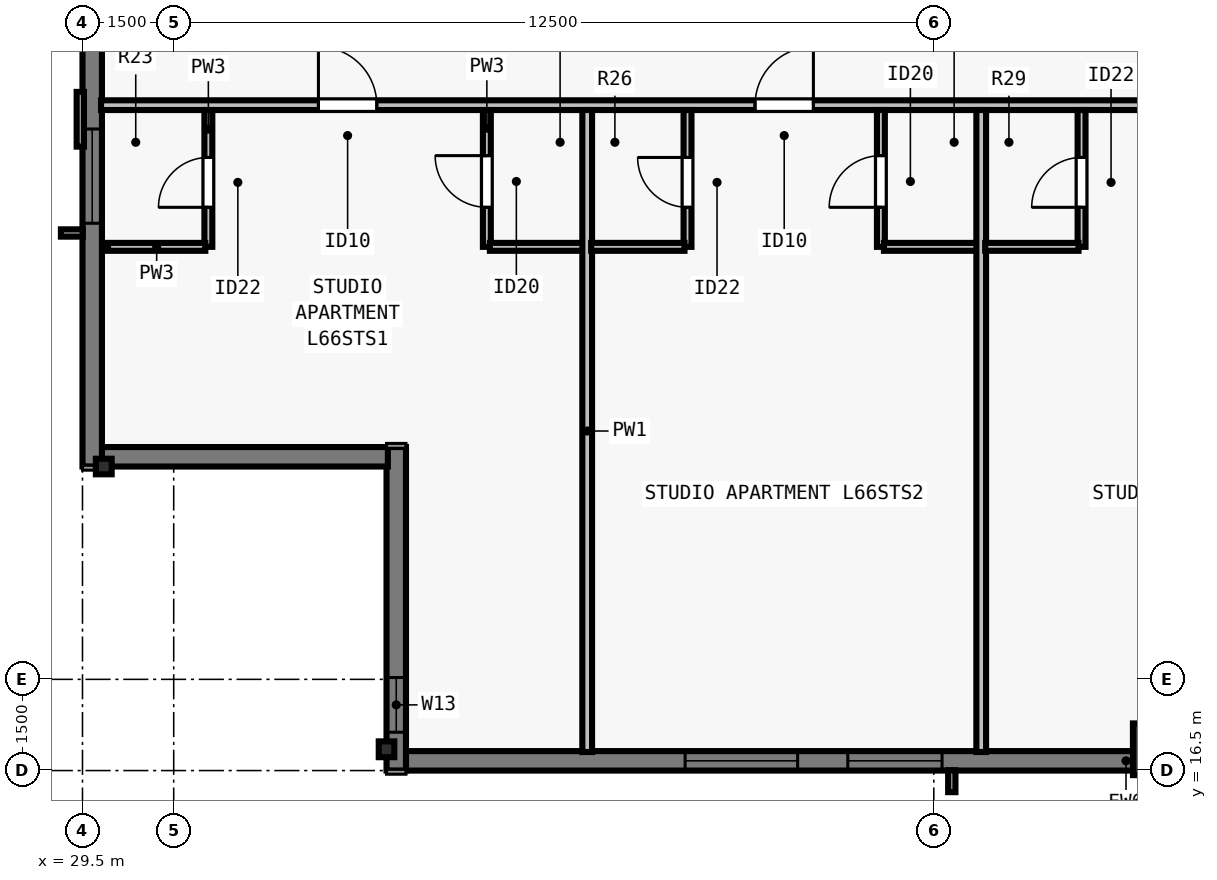
"""IFC4 building model, lengths in metres.
Left out: names, types, materials, properties, quantities, classifications, styles, units other than length and angle.
Written with IfcOpenShell. Run it as: python <this file> out.ifc"""

import sys

from ifc_helpers import new_model, si_unit, direction, frame, frame_2d, origin, origin_2d, place, context, subcontext, project, spatial, rectangle, i_section, extrude, element, fill, save


model = new_model("IFC4")
c1 = context("Model", 3, precision=1e-05, world=origin(), true_north=direction((0.0, 1.0)))
c2 = subcontext(c1, "Body", "Model", "MODEL_VIEW")
j1 = project(units=[si_unit("LENGTHUNIT", "METRE"), si_unit("PLANEANGLEUNIT", "RADIAN")], contexts=[c1])
p1 = place(None, origin())
s1 = spatial("IfcSite", under=j1, at=p1, CompositionType="ELEMENT")
p2 = place(p1, origin())
s2 = spatial("IfcBuilding", under=s1, at=p2, CompositionType="ELEMENT")
p3 = place(p2, frame((0.0, 0.0, 241.0)))
s3 = spatial("IfcBuildingStorey", under=s2, at=p3, CompositionType="ELEMENT", Elevation=241.0)
p4 = place(p3, frame((34.5, 16.85, 0.0), z_axis=(0.0, 0.0, 1.0), x_axis=(1.0, 0.0, 0.0)))
e1 = element("IfcColumn", 1, at=p4, inside=s3, PredefinedType="COLUMN", context=c2, shape_type="SweptSolid", body=[
    extrude(i_section(OverallWidth=0.256, OverallDepth=0.26, WebThickness=0.01, FlangeThickness=0.017, FilletRadius=0.013, at=origin_2d()), origin(), (0.0, 0.0, 1.0), 3.5),
])
p5 = place(p3, frame((47.2, 16.85, 0.0), z_axis=(0.0, 0.0, 1.0), x_axis=(1.0, 0.0, 0.0)))
e2 = element("IfcColumn", 2, at=p5, inside=s3, PredefinedType="COLUMN", context=c2, shape_type="SweptSolid", body=[
    extrude(rectangle(XDim=0.85, YDim=0.85, at=origin_2d()), origin(), (0.0, 0.0, 1.0), 3.5),
])
p6 = place(p3, frame((29.85, 21.5, 0.0), z_axis=(0.0, 0.0, 1.0), x_axis=(0.0, 1.0, 0.0)))
e3 = element("IfcColumn", 3, at=p6, inside=s3, PredefinedType="COLUMN", context=c2, shape_type="SweptSolid", body=[
    extrude(i_section(OverallWidth=0.256, OverallDepth=0.26, WebThickness=0.01, FlangeThickness=0.017, FilletRadius=0.013, at=origin_2d()), origin(), (0.0, 0.0, 1.0), 3.5),
])
p7 = place(p3, frame((69.5, 16.66, 0.0), z_axis=(0.0, 0.0, 1.0), x_axis=(-1.0, 0.0, 0.0)))
e4 = element("IfcWall", 4, at=p7, inside=s3, PredefinedType="SOLIDWALL", context=c2, shape_type="SweptSolid", body=[
    extrude(rectangle(XDim=34.702, YDim=0.32, at=frame_2d((17.351, 0.0))), origin(), (0.0, 0.0, 1.0), 3.29),
])
p8 = place(p7, frame((4.763, 0.0, 0.8)))
e5 = element("IfcOpeningElement", 5, at=p8, cuts=e4, PredefinedType="OPENING", context=c2, shape_type="SweptSolid", body=[
    extrude(rectangle(XDim=1.55, YDim=1.678, at=frame_2d((0.775, 0.839))), frame((0.0, 0.17, 0.0), z_axis=(0.0, -1.0, 0.0), x_axis=(1.0, 0.0, 0.0)), (0.0, 0.0, 1.0), 0.34),
])
p9 = place(p7, frame((7.988, 0.0, 0.8)))
e6 = element("IfcOpeningElement", 6, at=p9, cuts=e4, PredefinedType="OPENING", context=c2, shape_type="SweptSolid", body=[
    extrude(rectangle(XDim=1.85, YDim=1.678, at=frame_2d((0.925, 0.839))), frame((0.0, 0.17, 0.0), z_axis=(0.0, -1.0, 0.0), x_axis=(1.0, 0.0, 0.0)), (0.0, 0.0, 1.0), 0.34),
])
p10 = place(p7, frame((14.738, 0.0, 0.8)))
e7 = element("IfcOpeningElement", 7, at=p10, cuts=e4, PredefinedType="OPENING", context=c2, shape_type="SweptSolid", body=[
    extrude(rectangle(XDim=1.85, YDim=1.678, at=frame_2d((0.925, 0.839))), frame((0.0, 0.17, 0.0), z_axis=(0.0, -1.0, 0.0), x_axis=(1.0, 0.0, 0.0)), (0.0, 0.0, 1.0), 0.34),
])
p11 = place(p7, frame((18.264, 0.0, 0.8)))
e8 = element("IfcOpeningElement", 8, at=p11, cuts=e4, PredefinedType="OPENING", context=c2, shape_type="SweptSolid", body=[
    extrude(rectangle(XDim=1.55, YDim=1.678, at=frame_2d((0.775, 0.839))), frame((0.0, 0.17, 0.0), z_axis=(0.0, -1.0, 0.0), x_axis=(1.0, 0.0, 0.0)), (0.0, 0.0, 1.0), 0.34),
])
p12 = place(p7, frame((25.864, 0.0, 0.8)))
e9 = element("IfcOpeningElement", 9, at=p12, cuts=e4, PredefinedType="OPENING", context=c2, shape_type="SweptSolid", body=[
    extrude(rectangle(XDim=1.55, YDim=1.678, at=frame_2d((0.775, 0.839))), frame((0.0, 0.17, 0.0), z_axis=(0.0, -1.0, 0.0), x_axis=(1.0, 0.0, 0.0)), (0.0, 0.0, 1.0), 0.34),
])
p13 = place(p7, frame((28.24, 0.0, 0.8)))
e10 = element("IfcOpeningElement", 10, at=p13, cuts=e4, PredefinedType="OPENING", context=c2, shape_type="SweptSolid", body=[
    extrude(rectangle(XDim=1.85, YDim=1.678, at=frame_2d((0.925, 0.839))), frame((0.0, 0.17, 0.0), z_axis=(0.0, -1.0, 0.0), x_axis=(1.0, 0.0, 0.0)), (0.0, 0.0, 1.0), 0.34),
])
p14 = place(p3, frame((34.66, 16.5, 0.0), z_axis=(0.0, 0.0, 1.0), x_axis=(0.0, 1.0, 0.0)))
e11 = element("IfcWall", 11, at=p14, inside=s3, PredefinedType="SOLIDWALL", context=c2, shape_type="SweptSolid", body=[
    extrude(rectangle(XDim=5.32, YDim=0.32, at=frame_2d((2.66, 0.0))), origin(), (0.0, 0.0, 1.0), 3.29),
])
p15 = place(p14, frame((0.63, 0.0, 0.8)))
e12 = element("IfcOpeningElement", 12, at=p15, cuts=e11, PredefinedType="OPENING", context=c2, shape_type="SweptSolid", body=[
    extrude(rectangle(XDim=0.9, YDim=1.678, at=frame_2d((0.45, 0.839))), frame((0.0, 0.17, 0.0), z_axis=(0.0, -1.0, 0.0), x_axis=(1.0, 0.0, 0.0)), (0.0, 0.0, 1.0), 0.34),
])
p16 = place(p3, frame((34.522, 21.66, 0.0), z_axis=(0.0, 0.0, 1.0), x_axis=(-1.0, 0.0, 0.0)))
e13 = element("IfcWall", 13, at=p16, inside=s3, PredefinedType="SOLIDWALL", context=c2, shape_type="SweptSolid", body=[
    extrude(rectangle(XDim=4.724, YDim=0.32, at=frame_2d((2.362, 0.0))), origin(), (0.0, 0.0, 1.0), 3.29),
])
p17 = place(p3, frame((29.66, 21.5, 0.0), z_axis=(0.0, 0.0, 1.0), x_axis=(0.0, 1.0, 0.0)))
e14 = element("IfcWall", 14, at=p17, inside=s3, PredefinedType="SOLIDWALL", context=c2, shape_type="SweptSolid", body=[
    extrude(rectangle(XDim=13.802, YDim=0.32, at=frame_2d((6.901, 0.0))), origin(), (0.0, 0.0, 1.0), 3.29),
])
p18 = place(p17, frame((4.0, 0.0, 0.8)))
e15 = element("IfcOpeningElement", 15, at=p18, cuts=e14, PredefinedType="OPENING", context=c2, shape_type="SweptSolid", body=[
    extrude(rectangle(XDim=1.55, YDim=1.678, at=frame_2d((0.775, 0.839))), frame((0.0, 0.17, 0.0), z_axis=(0.0, -1.0, 0.0), x_axis=(1.0, 0.0, 0.0)), (0.0, 0.0, 1.0), 0.34),
])
p19 = place(p17, frame((9.451, 0.0, 0.8)))
e16 = element("IfcOpeningElement", 16, at=p19, cuts=e14, PredefinedType="OPENING", context=c2, shape_type="SweptSolid", body=[
    extrude(rectangle(XDim=1.85, YDim=1.678, at=frame_2d((0.925, 0.839))), frame((0.0, 0.17, 0.0), z_axis=(0.0, -1.0, 0.0), x_axis=(1.0, 0.0, 0.0)), (0.0, 0.0, 1.0), 0.34),
])
p20 = place(p3, frame((29.805, 27.442, 0.0), z_axis=(0.0, 0.0, 1.0), x_axis=(1.0, 0.0, 0.0)))
e17 = element("IfcWall", 17, at=p20, inside=s3, PredefinedType="PARTITIONING", context=c2, shape_type="SweptSolid", body=[
    extrude(rectangle(XDim=44.39, YDim=0.16, at=frame_2d((22.195, 0.0))), origin(), (0.0, 0.0, 1.0), 2.958),
])
p21 = place(p20, frame((3.575, 0.0, 0.0)))
e18 = element("IfcOpeningElement", 18, at=p21, cuts=e17, PredefinedType="OPENING", context=c2, shape_type="SweptSolid", body=[
    extrude(rectangle(XDim=0.96, YDim=2.18, at=frame_2d((0.48, 1.09))), frame((0.0, 0.09, 0.0), z_axis=(0.0, -1.0, 0.0), x_axis=(1.0, 0.0, 0.0)), (0.0, 0.0, 1.0), 0.18),
])
p22 = place(p20, frame((10.755, 0.0, 0.0)))
e19 = element("IfcOpeningElement", 19, at=p22, cuts=e17, PredefinedType="OPENING", context=c2, shape_type="SweptSolid", body=[
    extrude(rectangle(XDim=0.96, YDim=2.18, at=frame_2d((0.48, 1.09))), frame((0.0, 0.09, 0.0), z_axis=(0.0, -1.0, 0.0), x_axis=(1.0, 0.0, 0.0)), (0.0, 0.0, 1.0), 0.18),
])
p23 = place(p20, frame((18.115, 0.0, 0.0)))
e20 = element("IfcOpeningElement", 20, at=p23, cuts=e17, PredefinedType="OPENING", context=c2, shape_type="SweptSolid", body=[
    extrude(rectangle(XDim=0.96, YDim=2.18, at=frame_2d((0.48, 1.09))), frame((0.0, 0.09, 0.0), z_axis=(0.0, -1.0, 0.0), x_axis=(1.0, 0.0, 0.0)), (0.0, 0.0, 1.0), 0.18),
])
p24 = place(p20, frame((25.475, 0.0, 0.0)))
e21 = element("IfcOpeningElement", 21, at=p24, cuts=e17, PredefinedType="OPENING", context=c2, shape_type="SweptSolid", body=[
    extrude(rectangle(XDim=0.96, YDim=2.18, at=frame_2d((0.48, 1.09))), frame((0.0, 0.09, 0.0), z_axis=(0.0, -1.0, 0.0), x_axis=(1.0, 0.0, 0.0)), (0.0, 0.0, 1.0), 0.18),
])
p25 = place(p20, frame((32.835, 0.0, 0.0)))
e22 = element("IfcOpeningElement", 22, at=p25, cuts=e17, PredefinedType="OPENING", context=c2, shape_type="SweptSolid", body=[
    extrude(rectangle(XDim=0.96, YDim=2.18, at=frame_2d((0.48, 1.09))), frame((0.0, 0.09, 0.0), z_axis=(0.0, -1.0, 0.0), x_axis=(1.0, 0.0, 0.0)), (0.0, 0.0, 1.0), 0.18),
])
p26 = place(p20, frame((40.375, 0.0, 0.0)))
e23 = element("IfcOpeningElement", 23, at=p26, cuts=e17, PredefinedType="OPENING", context=c2, shape_type="SweptSolid", body=[
    extrude(rectangle(XDim=0.96, YDim=2.18, at=frame_2d((0.48, 1.09))), frame((0.0, 0.09, 0.0), z_axis=(0.0, -1.0, 0.0), x_axis=(1.0, 0.0, 0.0)), (0.0, 0.0, 1.0), 0.18),
])
p27 = place(p3, frame((31.57, 25.113, 0.0), z_axis=(0.0, 0.0, 1.0), x_axis=(0.0, 1.0, 0.0)))
e24 = element("IfcWall", 24, at=p27, inside=s3, PredefinedType="PLUMBINGWALL", context=c2, shape_type="SweptSolid", body=[
    extrude(rectangle(XDim=2.25, YDim=0.13, at=frame_2d((1.125, 0.0))), origin(), (0.0, 0.0, 1.0), 3.29),
])
p28 = place(p27, frame((0.65, 0.0, 0.0)))
e25 = element("IfcOpeningElement", 25, at=p28, cuts=e24, PredefinedType="OPENING", context=c2, shape_type="SweptSolid", body=[
    extrude(rectangle(XDim=0.82, YDim=2.1, at=frame_2d((0.41, 1.05))), frame((0.0, 0.075, 0.0), z_axis=(0.0, -1.0, 0.0), x_axis=(1.0, 0.0, 0.0)), (0.0, 0.0, 1.0), 0.15),
])
p29 = place(p3, frame((29.92, 25.113, 0.0), z_axis=(0.0, 0.0, 1.0), x_axis=(1.0, 0.0, 0.0)))
e26 = element("IfcWall", 26, at=p29, inside=s3, PredefinedType="PLUMBINGWALL", context=c2, shape_type="SweptSolid", body=[
    extrude(rectangle(XDim=1.6, YDim=0.13, at=frame_2d((0.8, 0.0))), origin(), (0.0, 0.0, 1.0), 3.29),
])
p30 = place(p3, frame((36.15, 25.113, 0.0), z_axis=(0.0, 0.0, 1.0), x_axis=(0.0, 1.0, 0.0)))
e27 = element("IfcWall", 27, at=p30, inside=s3, PredefinedType="PLUMBINGWALL", context=c2, shape_type="SweptSolid", body=[
    extrude(rectangle(XDim=2.25, YDim=0.13, at=frame_2d((1.125, 0.0))), origin(), (0.0, 0.0, 1.0), 3.29),
])
p31 = place(p30, frame((0.65, 0.0, 0.0)))
e28 = element("IfcOpeningElement", 28, at=p31, cuts=e27, PredefinedType="OPENING", context=c2, shape_type="SweptSolid", body=[
    extrude(rectangle(XDim=0.85, YDim=2.1, at=frame_2d((0.425, 1.05))), frame((0.0, 0.075, 0.0), z_axis=(0.0, -1.0, 0.0), x_axis=(1.0, 0.0, 0.0)), (0.0, 0.0, 1.0), 0.15),
])
p32 = place(p3, frame((36.2, 25.113, 0.0), z_axis=(0.0, 0.0, 1.0), x_axis=(1.0, 0.0, 0.0)))
e29 = element("IfcWall", 29, at=p32, inside=s3, PredefinedType="PLUMBINGWALL", context=c2, shape_type="SweptSolid", body=[
    extrude(rectangle(XDim=1.6, YDim=0.13, at=frame_2d((0.8, 0.0))), origin(), (0.0, 0.0, 1.0), 3.29),
])
p33 = place(p3, frame((37.8, 16.805, 0.0), z_axis=(0.0, 0.0, 1.0), x_axis=(0.0, 1.0, 0.0)))
e30 = element("IfcWall", 30, at=p33, inside=s3, PredefinedType="PARTITIONING", context=c2, shape_type="SweptSolid", body=[
    extrude(rectangle(XDim=10.558, YDim=0.16, at=frame_2d((5.279, 0.0))), origin(), (0.0, 0.0, 1.0), 2.573),
])
p34 = place(p3, frame((39.45, 25.113, 0.0), z_axis=(0.0, 0.0, 1.0), x_axis=(0.0, 1.0, 0.0)))
e31 = element("IfcWall", 31, at=p34, inside=s3, PredefinedType="PLUMBINGWALL", context=c2, shape_type="SweptSolid", body=[
    extrude(rectangle(XDim=2.25, YDim=0.13, at=frame_2d((1.125, 0.0))), origin(), (0.0, 0.0, 1.0), 3.29),
])
p35 = place(p34, frame((0.65, 0.0, 0.0)))
e32 = element("IfcOpeningElement", 32, at=p35, cuts=e31, PredefinedType="OPENING", context=c2, shape_type="SweptSolid", body=[
    extrude(rectangle(XDim=0.82, YDim=2.1, at=frame_2d((0.41, 1.05))), frame((0.0, 0.075, 0.0), z_axis=(0.0, -1.0, 0.0), x_axis=(1.0, 0.0, 0.0)), (0.0, 0.0, 1.0), 0.15),
])
p36 = place(p3, frame((37.865, 25.113, 0.0), z_axis=(0.0, 0.0, 1.0), x_axis=(1.0, 0.0, 0.0)))
e33 = element("IfcWall", 33, at=p36, inside=s3, PredefinedType="PLUMBINGWALL", context=c2, shape_type="SweptSolid", body=[
    extrude(rectangle(XDim=1.535, YDim=0.13, at=frame_2d((0.768, 0.0))), origin(), (0.0, 0.0, 1.0), 3.29),
])
p37 = place(p3, frame((42.63, 25.113, 0.0), z_axis=(0.0, 0.0, 1.0), x_axis=(0.0, 1.0, 0.0)))
e34 = element("IfcWall", 34, at=p37, inside=s3, PredefinedType="PLUMBINGWALL", context=c2, shape_type="SweptSolid", body=[
    extrude(rectangle(XDim=2.25, YDim=0.13, at=frame_2d((1.125, 0.0))), origin(), (0.0, 0.0, 1.0), 3.29),
])
p38 = place(p37, frame((0.65, 0.0, 0.0)))
e35 = element("IfcOpeningElement", 35, at=p38, cuts=e34, PredefinedType="OPENING", context=c2, shape_type="SweptSolid", body=[
    extrude(rectangle(XDim=0.85, YDim=2.1, at=frame_2d((0.425, 1.05))), frame((0.0, 0.075, 0.0), z_axis=(0.0, -1.0, 0.0), x_axis=(1.0, 0.0, 0.0)), (0.0, 0.0, 1.0), 0.15),
])
p39 = place(p3, frame((42.68, 25.113, 0.0), z_axis=(0.0, 0.0, 1.0), x_axis=(1.0, 0.0, 0.0)))
e36 = element("IfcWall", 36, at=p39, inside=s3, PredefinedType="PLUMBINGWALL", context=c2, shape_type="SweptSolid", body=[
    extrude(rectangle(XDim=1.6, YDim=0.13, at=frame_2d((0.8, 0.0))), origin(), (0.0, 0.0, 1.0), 3.29),
])
p40 = place(p3, frame((44.28, 16.805, 0.0), z_axis=(0.0, 0.0, 1.0), x_axis=(0.0, 1.0, 0.0)))
e37 = element("IfcWall", 37, at=p40, inside=s3, PredefinedType="PARTITIONING", context=c2, shape_type="SweptSolid", body=[
    extrude(rectangle(XDim=10.558, YDim=0.16, at=frame_2d((5.279, 0.0))), origin(), (0.0, 0.0, 1.0), 3.29),
])
p41 = place(p3, frame((45.93, 25.113, 0.0), z_axis=(0.0, 0.0, 1.0), x_axis=(0.0, 1.0, 0.0)))
e38 = element("IfcWall", 38, at=p41, inside=s3, PredefinedType="PLUMBINGWALL", context=c2, shape_type="SweptSolid", body=[
    extrude(rectangle(XDim=2.25, YDim=0.13, at=frame_2d((1.125, 0.0))), origin(), (0.0, 0.0, 1.0), 3.29),
])
p42 = place(p41, frame((0.65, 0.0, 0.0)))
e39 = element("IfcOpeningElement", 39, at=p42, cuts=e38, PredefinedType="OPENING", context=c2, shape_type="SweptSolid", body=[
    extrude(rectangle(XDim=0.82, YDim=2.1, at=frame_2d((0.41, 1.05))), frame((0.0, 0.075, 0.0), z_axis=(0.0, -1.0, 0.0), x_axis=(1.0, 0.0, 0.0)), (0.0, 0.0, 1.0), 0.15),
])
p43 = place(p3, frame((44.345, 25.113, 0.0), z_axis=(0.0, 0.0, 1.0), x_axis=(1.0, 0.0, 0.0)))
e40 = element("IfcWall", 40, at=p43, inside=s3, PredefinedType="PLUMBINGWALL", context=c2, shape_type="SweptSolid", body=[
    extrude(rectangle(XDim=1.535, YDim=0.13, at=frame_2d((0.768, 0.0))), origin(), (0.0, 0.0, 1.0), 3.29),
])
p44 = place(p12, origin())
e41 = element("IfcWindow", 41, at=p44, inside=s3, PartitioningType="SINGLE_PANEL", PredefinedType="WINDOW", context=c2, shape_type="SweptSolid", body=[
    extrude(rectangle(XDim=1.55, YDim=1.678, at=frame_2d((0.775, 0.839))), frame((0.0, -0.05, 0.0), z_axis=(0.0, -1.0, 0.0), x_axis=(1.0, 0.0, 0.0)), (0.0, 0.0, 1.0), 0.06),
])
fill(e9, e41)
p45 = place(p13, origin())
e42 = element("IfcWindow", 42, at=p45, inside=s3, PartitioningType="SINGLE_PANEL", PredefinedType="WINDOW", context=c2, shape_type="SweptSolid", body=[
    extrude(rectangle(XDim=1.85, YDim=1.678, at=frame_2d((0.925, 0.839))), frame((0.0, -0.05, 0.0), z_axis=(0.0, -1.0, 0.0), x_axis=(1.0, 0.0, 0.0)), (0.0, 0.0, 1.0), 0.06),
])
fill(e10, e42)
p46 = place(p18, origin())
e43 = element("IfcWindow", 43, at=p46, inside=s3, PartitioningType="SINGLE_PANEL", PredefinedType="WINDOW", context=c2, shape_type="SweptSolid", body=[
    extrude(rectangle(XDim=1.55, YDim=1.678, at=frame_2d((0.775, 0.839))), frame((0.0, -0.05, 0.0), z_axis=(0.0, -1.0, 0.0), x_axis=(1.0, 0.0, 0.0)), (0.0, 0.0, 1.0), 0.06),
])
fill(e15, e43)
p47 = place(p15, origin())
e44 = element("IfcWindow", 44, at=p47, inside=s3, PartitioningType="SINGLE_PANEL", PredefinedType="WINDOW", context=c2, shape_type="SweptSolid", body=[
    extrude(rectangle(XDim=0.9, YDim=1.678, at=frame_2d((0.45, 0.839))), frame((0.0, -0.04, 0.0), z_axis=(0.0, -1.0, 0.0), x_axis=(1.0, 0.0, 0.0)), (0.0, 0.0, 1.0), 0.06),
])
fill(e12, e44)
p48 = place(p28, origin())
e45 = element("IfcDoor", 45, at=p48, inside=s3, OperationType="SINGLE_SWING_LEFT", PredefinedType="DOOR", context=c2, shape_type="SweptSolid", body=[
    extrude(rectangle(XDim=0.82, YDim=2.1, at=frame_2d((0.41, 1.05))), frame((0.0, 0.025, 0.0), z_axis=(0.0, -1.0, 0.0), x_axis=(1.0, 0.0, 0.0)), (0.0, 0.0, 1.0), 0.05),
])
fill(e25, e45)
p49 = place(p31, origin())
e46 = element("IfcDoor", 46, at=p49, inside=s3, OperationType="SINGLE_SWING_RIGHT", PredefinedType="DOOR", context=c2, shape_type="SweptSolid", body=[
    extrude(rectangle(XDim=0.85, YDim=2.1, at=frame_2d((0.425, 1.05))), frame((0.0, 0.025, 0.0), z_axis=(0.0, -1.0, 0.0), x_axis=(1.0, 0.0, 0.0)), (0.0, 0.0, 1.0), 0.05),
])
fill(e28, e46)
p50 = place(p21, origin())
e47 = element("IfcDoor", 47, at=p50, inside=s3, OperationType="SINGLE_SWING_LEFT", PredefinedType="DOOR", context=c2, shape_type="SweptSolid", body=[
    extrude(rectangle(XDim=0.96, YDim=2.18, at=frame_2d((0.48, 1.09))), frame((0.0, 0.025, 0.0), z_axis=(0.0, -1.0, 0.0), x_axis=(1.0, 0.0, 0.0)), (0.0, 0.0, 1.0), 0.05),
])
fill(e18, e47)
p51 = place(p35, origin())
e48 = element("IfcDoor", 48, at=p51, inside=s3, OperationType="SINGLE_SWING_RIGHT", PredefinedType="DOOR", context=c2, shape_type="SweptSolid", body=[
    extrude(rectangle(XDim=0.82, YDim=2.1, at=frame_2d((0.41, 1.05))), frame((0.0, 0.025, 0.0), z_axis=(0.0, -1.0, 0.0), x_axis=(1.0, 0.0, 0.0)), (0.0, 0.0, 1.0), 0.05),
])
fill(e32, e48)
p52 = place(p38, origin())
e49 = element("IfcDoor", 49, at=p52, inside=s3, OperationType="SINGLE_SWING_LEFT", PredefinedType="DOOR", context=c2, shape_type="SweptSolid", body=[
    extrude(rectangle(XDim=0.85, YDim=2.1, at=frame_2d((0.425, 1.05))), frame((0.0, 0.025, 0.0), z_axis=(0.0, -1.0, 0.0), x_axis=(1.0, 0.0, 0.0)), (0.0, 0.0, 1.0), 0.05),
])
fill(e35, e49)
p53 = place(p22, origin())
e50 = element("IfcDoor", 50, at=p53, inside=s3, OperationType="SINGLE_SWING_RIGHT", PredefinedType="DOOR", context=c2, shape_type="SweptSolid", body=[
    extrude(rectangle(XDim=0.96, YDim=2.18, at=frame_2d((0.48, 1.09))), frame((0.0, 0.025, 0.0), z_axis=(0.0, -1.0, 0.0), x_axis=(1.0, 0.0, 0.0)), (0.0, 0.0, 1.0), 0.05),
])
fill(e19, e50)
p54 = place(p42, origin())
e51 = element("IfcDoor", 51, at=p54, inside=s3, OperationType="SINGLE_SWING_LEFT", PredefinedType="DOOR", context=c2, shape_type="SweptSolid", body=[
    extrude(rectangle(XDim=0.82, YDim=2.1, at=frame_2d((0.41, 1.05))), frame((0.0, 0.025, 0.0), z_axis=(0.0, -1.0, 0.0), x_axis=(1.0, 0.0, 0.0)), (0.0, 0.0, 1.0), 0.05),
])
fill(e39, e51)
save(model, sys.argv[1])
